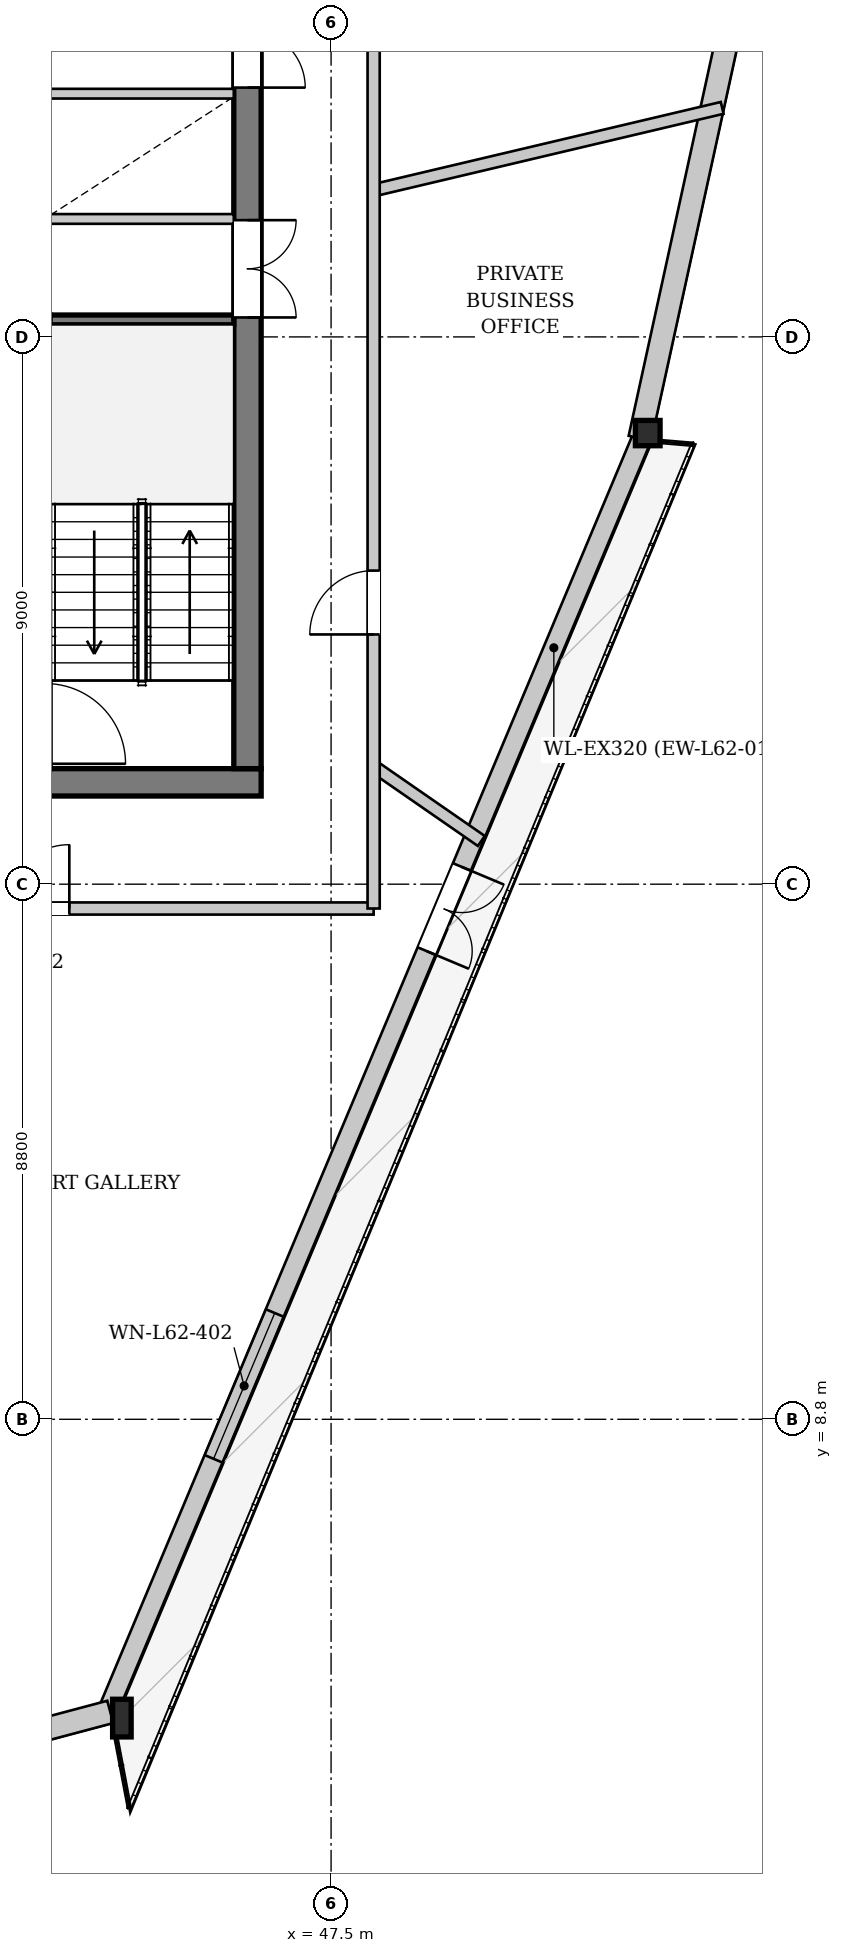
"""IFC4 building model, lengths in metres.
Left out: names, types, materials, properties, quantities, classifications, styles, units other than length and angle.
Written with IfcOpenShell. Run it as: python <this file> out.ifc"""

import sys

from ifc_helpers import new_model, si_unit, direction, frame, frame_2d, origin, origin_2d, place, context, subcontext, project, spatial, rectangle, i_section, extrude, source, transform, mapped, element, fill, save


model = new_model("IFC4")
c1 = context("Model", 3, precision=1e-05, world=origin(), true_north=direction((0.0, 1.0)))
c2 = subcontext(c1, "Body", "Model", "MODEL_VIEW")
j1 = project(units=[si_unit("LENGTHUNIT", "METRE"), si_unit("PLANEANGLEUNIT", "RADIAN")], contexts=[c1])
p1 = place(None, origin())
s1 = spatial("IfcSite", under=j1, at=p1, CompositionType="ELEMENT")
p2 = place(p1, origin())
s2 = spatial("IfcBuilding", under=s1, at=p2, CompositionType="ELEMENT")
p3 = place(p2, frame((0.0, 0.0, 234.5)))
s3 = spatial("IfcBuildingStorey", under=s2, at=p3, CompositionType="ELEMENT", Elevation=234.5)
m1 = source(origin(), c2, "Body", "SweptSolid", [
    extrude(i_section(OverallWidth=0.305, OverallDepth=0.62, WebThickness=0.021, FlangeThickness=0.04, at=origin_2d()), origin(), (0.0, 0.0, 1.0), 3.451),
])
p4 = place(p3, frame((43.917, 3.804, 0.0), z_axis=(0.082284317095, 0.047474442623, 0.995477507761), x_axis=(-0.499743945175, 0.866173186644, 0.0)))
e1 = element("IfcColumn", 1, at=p4, inside=s3, PredefinedType="COLUMN", context=c2, shape_type="MappedRepresentation", body=[
    mapped(m1, transform((0.0, 0.0, 0.0), x_axis=(1.0, 0.0, 0.0), y_axis=(0.0, 1.0, 0.0), z_axis=(0.0, 0.0, 1.0), scale=1.0)),
])
m2 = source(origin(), c2, "Body", "SweptSolid", [
    extrude(i_section(OverallWidth=0.406, OverallDepth=0.416, WebThickness=0.027, FlangeThickness=0.042, at=origin_2d()), origin(), (0.0, 0.0, 1.0), 3.446),
])
p5 = place(p3, frame((52.765, 24.892, 0.0), z_axis=(-0.033366511552, 0.073392157045, 0.996744835548), x_axis=(-0.910336382484, -0.413869146863, 0.0)))
e2 = element("IfcColumn", 2, at=p5, inside=s3, PredefinedType="COLUMN", context=c2, shape_type="MappedRepresentation", body=[
    mapped(m2, transform((0.0, 0.0, 0.0), x_axis=(1.0, 0.0, 0.0), y_axis=(0.0, 1.0, 0.0), z_axis=(0.0, 0.0, 1.0), scale=1.0)),
])
p6 = place(p3, frame((52.618, 24.954, 0.0), z_axis=(0.0, 0.0, 1.0), x_axis=(-0.386897414412, -0.922122763368, 0.0)))
e3 = element("IfcWall", 3, at=p6, inside=s3, PredefinedType="SOLIDWALL", context=c2, shape_type="SweptSolid", body=[
    extrude(rectangle(XDim=22.869, YDim=0.32, at=frame_2d((11.435, 0.0))), origin(), (0.0, 0.0, 1.0), 2.872),
])
p7 = place(p6, frame((7.668, 0.0, 0.0)))
e4 = element("IfcOpeningElement", 4, at=p7, cuts=e3, PredefinedType="OPENING", context=c2, shape_type="SweptSolid", body=[
    extrude(rectangle(XDim=1.5, YDim=2.3, at=frame_2d((0.75, 1.15))), frame((0.0, 0.17, 0.0), z_axis=(0.0, -1.0, 0.0), x_axis=(1.0, 0.0, 0.0)), (0.0, 0.0, 1.0), 0.34),
])
p8 = place(p6, frame((15.623, 0.0, 0.402)))
e5 = element("IfcOpeningElement", 5, at=p8, cuts=e3, PredefinedType="OPENING", context=c2, shape_type="SweptSolid", body=[
    extrude(rectangle(XDim=2.6, YDim=2.35, at=frame_2d((1.3, 1.175))), frame((0.0, 0.17, 0.0), z_axis=(0.0, -1.0, 0.0), x_axis=(1.0, 0.0, 0.0)), (0.0, 0.0, 1.0), 0.34),
])
p9 = place(p3, frame((43.868, 3.988, 0.0), z_axis=(0.0, 0.0, 1.0), x_axis=(-0.96637388207, -0.25714105089, 0.0)))
e6 = element("IfcWall", 6, at=p9, inside=s3, PredefinedType="SOLIDWALL", context=c2, shape_type="SweptSolid", body=[
    extrude(rectangle(XDim=3.525, YDim=0.38, at=frame_2d((1.763, 0.0))), origin(), (0.0, 0.0, 1.0), 2.872),
])
p10 = place(p3, frame((57.467, 47.273, 0.0), z_axis=(0.0, 0.0, 1.0), x_axis=(-0.213695286904, -0.976900365623, 0.0)))
e7 = element("IfcWall", 7, at=p10, inside=s3, PredefinedType="SOLIDWALL", context=c2, shape_type="SweptSolid", body=[
    extrude(rectangle(XDim=22.869, YDim=0.38, at=frame_2d((11.435, 0.0))), origin(), (0.0, 0.0, 1.0), 2.872),
])
p11 = place(p10, frame((5.303, 0.0, 0.502)))
e8 = element("IfcOpeningElement", 8, at=p11, cuts=e7, PredefinedType="OPENING", context=c2, shape_type="SweptSolid", body=[
    extrude(rectangle(XDim=2.2, YDim=2.25, at=frame_2d((1.1, 1.125))), frame((0.0, 0.2, 0.0), z_axis=(0.0, -1.0, 0.0), x_axis=(1.0, 0.0, 0.0)), (0.0, 0.0, 1.0), 0.4),
])
p12 = place(p10, frame((13.766, 0.0, 0.502)))
e9 = element("IfcOpeningElement", 9, at=p12, cuts=e7, PredefinedType="OPENING", context=c2, shape_type="SweptSolid", body=[
    extrude(rectangle(XDim=2.2, YDim=2.25, at=frame_2d((1.1, 1.125))), frame((0.0, 0.2, 0.0), z_axis=(0.0, -1.0, 0.0), x_axis=(1.0, 0.0, 0.0)), (0.0, 0.0, 1.0), 0.4),
])
p13 = place(p3, frame((46.35, 19.275, 0.0), z_axis=(0.0, 0.0, 1.0), x_axis=(-1.0, 0.0, 0.0)))
e10 = element("IfcWall", 10, at=p13, inside=s3, PredefinedType="SHEAR", context=c2, shape_type="SweptSolid", body=[
    extrude(rectangle(XDim=16.7, YDim=0.45, at=frame_2d((8.35, 0.0))), origin(), (0.0, 0.0, 1.0), 3.38),
])
p14 = place(p13, frame((4.55, 0.0, 0.0)))
e11 = element("IfcOpeningElement", 11, at=p14, cuts=e10, PredefinedType="OPENING", context=c2, shape_type="SweptSolid", body=[
    extrude(rectangle(XDim=1.12, YDim=2.25, at=frame_2d((0.56, 1.125))), frame((0.0, 0.235, 0.0), z_axis=(0.0, -1.0, 0.0), x_axis=(1.0, 0.0, 0.0)), (0.0, 0.0, 1.0), 0.47),
])
p15 = place(p13, frame((11.05, 0.0, 0.0)))
e12 = element("IfcOpeningElement", 12, at=p15, cuts=e10, PredefinedType="OPENING", context=c2, shape_type="SweptSolid", body=[
    extrude(rectangle(XDim=1.12, YDim=2.25, at=frame_2d((0.56, 1.125))), frame((0.0, 0.235, 0.0), z_axis=(0.0, -1.0, 0.0), x_axis=(1.0, 0.0, 0.0)), (0.0, 0.0, 1.0), 0.47),
])
p16 = place(p3, frame((46.125, 33.7, 0.0), z_axis=(0.0, 0.0, 1.0), x_axis=(0.0, -1.0, 0.0)))
e13 = element("IfcWall", 13, at=p16, inside=s3, PredefinedType="SHEAR", context=c2, shape_type="SweptSolid", body=[
    extrude(rectangle(XDim=14.2, YDim=0.45, at=frame_2d((7.1, 0.0))), origin(), (0.0, 0.0, 1.0), 3.38),
])
p17 = place(p16, frame((5.18, 0.0, 0.0)))
e14 = element("IfcOpeningElement", 14, at=p17, cuts=e13, PredefinedType="OPENING", context=c2, shape_type="SweptSolid", body=[
    extrude(rectangle(XDim=1.6, YDim=2.2, at=frame_2d((0.8, 1.1))), frame((0.0, 0.235, 0.0), z_axis=(0.0, -1.0, 0.0), x_axis=(1.0, 0.0, 0.0)), (0.0, 0.0, 1.0), 0.47),
])
p18 = place(p16, frame((2.05, 0.0, 0.0)))
e15 = element("IfcOpeningElement", 15, at=p18, cuts=e13, PredefinedType="OPENING", context=c2, shape_type="SweptSolid", body=[
    extrude(rectangle(XDim=0.95, YDim=2.1, at=frame_2d((0.475, 1.05))), frame((0.0, 0.235, 0.0), z_axis=(0.0, -1.0, 0.0), x_axis=(1.0, 0.0, 0.0)), (0.0, 0.0, 1.0), 0.47),
])
p19 = place(p3, frame((42.88, 26.88, 0.0), z_axis=(0.0, 0.0, 1.0), x_axis=(1.0, 0.0, 0.0)))
e16 = element("IfcWall", 16, at=p19, inside=s3, PredefinedType="PARTITIONING", context=c2, shape_type="SweptSolid", body=[
    extrude(rectangle(XDim=3.02, YDim=0.16, at=frame_2d((1.51, 0.0))), origin(), (0.0, 0.0, 1.0), 3.38),
])
p20 = place(p3, frame((33.28, 28.54, 0.0), z_axis=(0.0, 0.0, 1.0), x_axis=(1.0, 0.0, 0.0)))
e17 = element("IfcWall", 17, at=p20, inside=s3, PredefinedType="PARTITIONING", context=c2, shape_type="SweptSolid", body=[
    extrude(rectangle(XDim=12.62, YDim=0.16, at=frame_2d((6.31, 0.0))), origin(), (0.0, 0.0, 1.0), 3.38),
])
p21 = place(p20, frame((0.26, 0.0, 0.0)))
e18 = element("IfcOpeningElement", 18, at=p21, cuts=e17, PredefinedType="OPENING", context=c2, shape_type="SweptSolid", body=[
    extrude(rectangle(XDim=1.1, YDim=2.2, at=frame_2d((0.55, 1.1))), frame((0.0, 0.09, 0.0), z_axis=(0.0, -1.0, 0.0), x_axis=(1.0, 0.0, 0.0)), (0.0, 0.0, 1.0), 0.18),
])
p22 = place(p20, frame((2.01, 0.0, 0.0)))
e19 = element("IfcOpeningElement", 19, at=p22, cuts=e17, PredefinedType="OPENING", context=c2, shape_type="SweptSolid", body=[
    extrude(rectangle(XDim=1.1, YDim=2.2, at=frame_2d((0.55, 1.1))), frame((0.0, 0.09, 0.0), z_axis=(0.0, -1.0, 0.0), x_axis=(1.0, 0.0, 0.0)), (0.0, 0.0, 1.0), 0.18),
])
p23 = place(p20, frame((3.76, 0.0, 0.0)))
e20 = element("IfcOpeningElement", 20, at=p23, cuts=e17, PredefinedType="OPENING", context=c2, shape_type="SweptSolid", body=[
    extrude(rectangle(XDim=1.1, YDim=2.2, at=frame_2d((0.55, 1.1))), frame((0.0, 0.09, 0.0), z_axis=(0.0, -1.0, 0.0), x_axis=(1.0, 0.0, 0.0)), (0.0, 0.0, 1.0), 0.18),
])
p24 = place(p3, frame((40.72, 30.6, 0.0), z_axis=(0.0, 0.0, 1.0), x_axis=(1.0, 0.0, 0.0)))
e21 = element("IfcWall", 21, at=p24, inside=s3, PredefinedType="PARTITIONING", context=c2, shape_type="SweptSolid", body=[
    extrude(rectangle(XDim=5.18, YDim=0.16, at=frame_2d((2.59, 0.0))), origin(), (0.0, 0.0, 1.0), 3.38),
])
p25 = place(p3, frame((48.2, 19.537, 0.0), z_axis=(0.0, 0.0, 1.0), x_axis=(0.822159557719, -0.569257113834, 0.0)))
e22 = element("IfcWall", 22, at=p25, inside=s3, PredefinedType="PARTITIONING", context=c2, shape_type="SweptSolid", body=[
    extrude(rectangle(XDim=2.155, YDim=0.2, at=frame_2d((1.077, 0.0))), origin(), (0.0, 0.0, 1.0), 3.38),
])
p26 = place(p3, frame((48.2, 29.011, 0.0), z_axis=(0.0, 0.0, 1.0), x_axis=(0.973180732473, 0.230041869979, 0.0)))
e23 = element("IfcWall", 23, at=p26, inside=s3, PredefinedType="PARTITIONING", context=c2, shape_type="SweptSolid", body=[
    extrude(rectangle(XDim=5.89, YDim=0.2, at=frame_2d((2.945, 0.0))), origin(), (0.0, 0.0, 1.0), 3.38),
])
p27 = place(p3, frame((27.8, 17.2, 0.0), z_axis=(0.0, 0.0, 1.0), x_axis=(1.0, 0.0, 0.0)))
e24 = element("IfcWall", 24, at=p27, inside=s3, PredefinedType="PARTITIONING", context=c2, shape_type="SweptSolid", body=[
    extrude(rectangle(XDim=20.4, YDim=0.2, at=frame_2d((10.2, 0.0))), origin(), (0.0, 0.0, 1.0), 3.38),
])
p28 = place(p27, frame((7.636, 0.0, 0.0)))
e25 = element("IfcOpeningElement", 25, at=p28, cuts=e24, PredefinedType="OPENING", context=c2, shape_type="SweptSolid", body=[
    extrude(rectangle(XDim=1.05, YDim=2.2, at=frame_2d((0.525, 1.1))), frame((0.0, 0.11, 0.0), z_axis=(0.0, -1.0, 0.0), x_axis=(1.0, 0.0, 0.0)), (0.0, 0.0, 1.0), 0.22),
])
p29 = place(p27, frame((14.345, 0.0, 0.0)))
e26 = element("IfcOpeningElement", 26, at=p29, cuts=e24, PredefinedType="OPENING", context=c2, shape_type="SweptSolid", body=[
    extrude(rectangle(XDim=1.05, YDim=2.2, at=frame_2d((0.525, 1.1))), frame((0.0, 0.11, 0.0), z_axis=(0.0, -1.0, 0.0), x_axis=(1.0, 0.0, 0.0)), (0.0, 0.0, 1.0), 0.22),
])
p30 = place(p3, frame((48.2, 17.2, 0.0), z_axis=(0.0, 0.0, 1.0), x_axis=(0.0, 1.0, 0.0)))
e27 = element("IfcWall", 27, at=p30, inside=s3, PredefinedType="PARTITIONING", context=c2, shape_type="SweptSolid", body=[
    extrude(rectangle(XDim=18.8, YDim=0.2, at=frame_2d((9.4, 0.0))), origin(), (0.0, 0.0, 1.0), 3.065),
])
p31 = place(p30, frame((4.507, 0.0, 0.0)))
e28 = element("IfcOpeningElement", 28, at=p31, cuts=e27, PredefinedType="OPENING", context=c2, shape_type="SweptSolid", body=[
    extrude(rectangle(XDim=1.05, YDim=2.2, at=frame_2d((0.525, 1.1))), frame((0.0, 0.11, 0.0), z_axis=(0.0, -1.0, 0.0), x_axis=(1.0, 0.0, 0.0)), (0.0, 0.0, 1.0), 0.22),
])
p32 = place(p30, frame((17.45, 0.0, 0.0)))
e29 = element("IfcOpeningElement", 29, at=p32, cuts=e27, PredefinedType="OPENING", context=c2, shape_type="SweptSolid", body=[
    extrude(rectangle(XDim=1.05, YDim=2.2, at=frame_2d((0.525, 1.1))), frame((0.0, 0.11, 0.0), z_axis=(0.0, -1.0, 0.0), x_axis=(1.0, 0.0, 0.0)), (0.0, 0.0, 1.0), 0.22),
])
m3 = source(origin(), c2, "Body", "SweptSolid", [
    extrude(rectangle(XDim=1.5, YDim=2.3, at=frame_2d((0.75, 1.15))), frame((0.0, 0.025, 0.0), z_axis=(0.0, -1.0, 0.0), x_axis=(1.0, 0.0, 0.0)), (0.0, 0.0, 1.0), 0.05),
])
p33 = place(p7, origin())
e30 = element("IfcDoor", 30, at=p33, inside=s3, OperationType="DOUBLE_DOOR_SINGLE_SWING", PredefinedType="DOOR", context=c2, shape_type="MappedRepresentation", body=[
    mapped(m3, transform((0.0, 0.0, 0.0), x_axis=(1.0, 0.0, 0.0), y_axis=(0.0, 1.0, 0.0), z_axis=(0.0, 0.0, 1.0), scale=1.0)),
])
fill(e4, e30)
m4 = source(origin(), c2, "Body", "SweptSolid", [
    extrude(rectangle(XDim=2.6, YDim=2.35, at=frame_2d((1.3, 1.175))), frame((0.0, 0.03, 0.0), z_axis=(0.0, -1.0, 0.0), x_axis=(1.0, 0.0, 0.0)), (0.0, 0.0, 1.0), 0.06),
])
p34 = place(p8, origin())
e31 = element("IfcWindow", 31, at=p34, inside=s3, PartitioningType="SINGLE_PANEL", PredefinedType="WINDOW", context=c2, shape_type="MappedRepresentation", body=[
    mapped(m4, transform((0.0, 0.0, 0.0), x_axis=(1.0, 0.0, 0.0), y_axis=(0.0, 1.0, 0.0), z_axis=(0.0, 0.0, 1.0), scale=1.0)),
])
fill(e5, e31)
m5 = source(origin(), c2, "Body", "SweptSolid", [
    extrude(rectangle(XDim=1.6, YDim=2.2, at=frame_2d((0.8, 1.1))), frame((0.0, 0.025, 0.0), z_axis=(0.0, -1.0, 0.0), x_axis=(1.0, 0.0, 0.0)), (0.0, 0.0, 1.0), 0.05),
])
p35 = place(p17, origin())
e32 = element("IfcDoor", 32, at=p35, inside=s3, OperationType="DOUBLE_DOOR_SINGLE_SWING", PredefinedType="DOOR", context=c2, shape_type="MappedRepresentation", body=[
    mapped(m5, transform((0.0, 0.0, 0.0), x_axis=(1.0, 0.0, 0.0), y_axis=(0.0, 1.0, 0.0), z_axis=(0.0, 0.0, 1.0), scale=1.0)),
])
fill(e14, e32)
m6 = source(origin(), c2, "Body", "SweptSolid", [
    extrude(rectangle(XDim=0.95, YDim=2.1, at=frame_2d((0.475, 1.05))), frame((0.0, 0.025, 0.0), z_axis=(0.0, -1.0, 0.0), x_axis=(1.0, 0.0, 0.0)), (0.0, 0.0, 1.0), 0.05),
])
p36 = place(p18, origin())
e33 = element("IfcDoor", 33, at=p36, inside=s3, OperationType="SINGLE_SWING_RIGHT", PredefinedType="DOOR", context=c2, shape_type="MappedRepresentation", body=[
    mapped(m6, transform((0.0, 0.0, 0.0), x_axis=(1.0, 0.0, 0.0), y_axis=(0.0, 1.0, 0.0), z_axis=(0.0, 0.0, 1.0), scale=1.0)),
])
fill(e15, e33)
m7 = source(origin(), c2, "Body", "SweptSolid", [
    extrude(rectangle(XDim=1.05, YDim=2.2, at=frame_2d((0.525, 1.1))), frame((0.0, 0.025, 0.0), z_axis=(0.0, -1.0, 0.0), x_axis=(1.0, 0.0, 0.0)), (0.0, 0.0, 1.0), 0.05),
])
p37 = place(p29, origin())
e34 = element("IfcDoor", 34, at=p37, inside=s3, OperationType="SINGLE_SWING_RIGHT", PredefinedType="DOOR", context=c2, shape_type="MappedRepresentation", body=[
    mapped(m7, transform((0.0, 0.0, 0.0), x_axis=(1.0, 0.0, 0.0), y_axis=(0.0, 1.0, 0.0), z_axis=(0.0, 0.0, 1.0), scale=1.0)),
])
fill(e26, e34)
p38 = place(p31, origin())
e35 = element("IfcDoor", 35, at=p38, inside=s3, OperationType="SINGLE_SWING_LEFT", PredefinedType="DOOR", context=c2, shape_type="MappedRepresentation", body=[
    mapped(m7, transform((0.0, 0.0, 0.0), x_axis=(1.0, 0.0, 0.0), y_axis=(0.0, 1.0, 0.0), z_axis=(0.0, 0.0, 1.0), scale=1.0)),
])
fill(e28, e35)
save(model, sys.argv[1])
